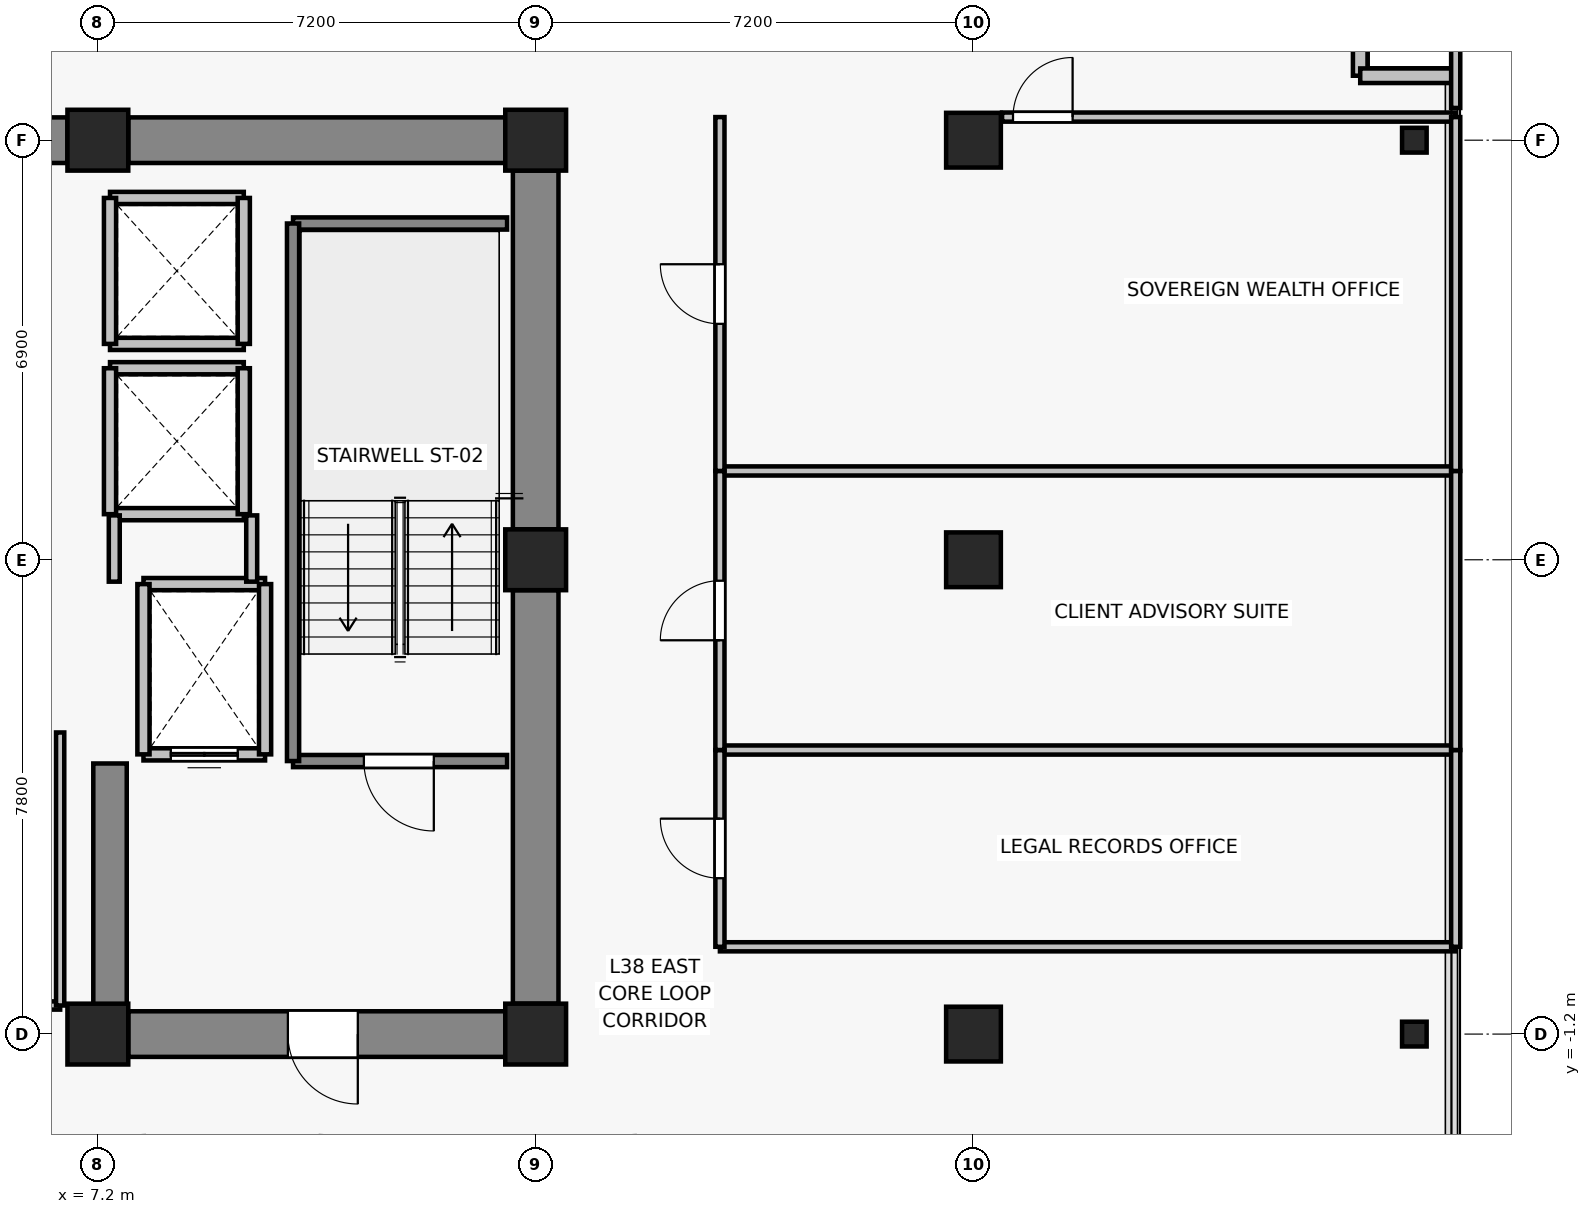
"""IFC4 building model, lengths in metres.
Left out: names, types, materials, properties, quantities, classifications, styles, units other than length and angle.
Written with IfcOpenShell. Run it as: python <this file> out.ifc"""

import sys

from ifc_helpers import new_model, si_unit, direction, frame, frame_2d, origin, origin_2d, place, context, subcontext, project, spatial, rectangle, i_section, extrude, source, transform, mapped, element, fill, save


model = new_model("IFC4")
c1 = context("Model", 3, precision=1e-05, world=origin(), true_north=direction((0.0, 1.0)))
c2 = subcontext(c1, "Body", "Model", "MODEL_VIEW")
j1 = project(units=[si_unit("LENGTHUNIT", "METRE"), si_unit("PLANEANGLEUNIT", "RADIAN")], contexts=[c1])
p1 = place(None, origin())
s1 = spatial("IfcSite", under=j1, at=p1, CompositionType="ELEMENT")
p2 = place(p1, origin())
s2 = spatial("IfcBuilding", under=s1, at=p2, CompositionType="ELEMENT")
p3 = place(p2, frame((0.0, 0.0, 136.3)))
s3 = spatial("IfcBuildingStorey", under=s2, at=p3, CompositionType="ELEMENT", Elevation=136.3)
for number, where, z_axis, x_axis in (
    (1, (7.2, -1.2, 0.0), (0.0, 0.0, 1.0), (1.0, 0.0, 0.0)),
    (2, (14.4, -1.2, 0.0), (0.0, 0.0, 1.0), (1.0, 0.0, 0.0)),
    (3, (14.4, 6.6, 0.0), (0.0, 0.0, 1.0), (1.0, 0.0, 0.0)),
    (4, (7.2, 13.5, 0.0), (0.0, 0.0, 1.0), (1.0, 0.0, 0.0)),
    (5, (14.4, 13.5, 0.0), (0.0, 0.0, 1.0), (1.0, 0.0, 0.0)),
):
    element("IfcColumn", number, at=place(p3, frame(where, z_axis=z_axis, x_axis=x_axis)), inside=s3, PredefinedType="COLUMN", context=c2, shape_type="SweptSolid", body=[
        extrude(rectangle(XDim=1.0, YDim=1.0, at=origin_2d()), origin(), (0.0, 0.0, 1.0), 3.3),
    ])
for number, where, z_axis, x_axis in (
    (6, (21.6, -1.2, 0.0), (0.0, 0.0, 1.0), (1.0, 0.0, 0.0)),
    (7, (21.6, 6.6, 0.0), (0.0, 0.0, 1.0), (1.0, 0.0, 0.0)),
    (8, (21.6, 13.5, 0.0), (0.0, 0.0, 1.0), (1.0, 0.0, 0.0)),
):
    element("IfcColumn", number, at=place(p3, frame(where, z_axis=z_axis, x_axis=x_axis)), inside=s3, PredefinedType="COLUMN", context=c2, shape_type="SweptSolid", body=[
        extrude(rectangle(XDim=0.9, YDim=0.9, at=origin_2d()), origin(), (0.0, 0.0, 1.0), 3.3),
    ])
for number, where, z_axis, x_axis in (
    (9, (28.85, -1.2, 0.0), (0.0, 0.0, 1.0), (1.0, 0.0, 0.0)),
    (10, (28.85, 13.5, 0.0), (0.0, 0.0, 1.0), (1.0, 0.0, 0.0)),
):
    element("IfcColumn", number, at=place(p3, frame(where, z_axis=z_axis, x_axis=x_axis)), inside=s3, PredefinedType="COLUMN", context=c2, shape_type="SweptSolid", body=[
        extrude(i_section(OverallWidth=0.404, OverallDepth=0.407, WebThickness=0.022, FlangeThickness=0.032, FilletRadius=0.015, at=origin_2d()), origin(), (0.0, 0.0, 1.0), 3.3),
    ])
p4 = place(p3, frame((-6.7, 13.5, 0.0), z_axis=(0.0, 0.0, 1.0), x_axis=(1.0, 0.0, 0.0)))
e11 = element("IfcWall", 11, at=p4, inside=s3, PredefinedType="SHEAR", context=c2, shape_type="SweptSolid", body=[
    extrude(rectangle(XDim=13.4, YDim=0.75, at=frame_2d((6.7, 0.0))), origin(), (0.0, 0.0, 1.0), 3.05),
])
p5 = place(p3, frame((7.7, 13.5, 0.0), z_axis=(0.0, 0.0, 1.0), x_axis=(1.0, 0.0, 0.0)))
e12 = element("IfcWall", 12, at=p5, inside=s3, PredefinedType="SHEAR", context=c2, shape_type="SweptSolid", body=[
    extrude(rectangle(XDim=6.2, YDim=0.75, at=frame_2d((3.1, 0.0))), origin(), (0.0, 0.0, 1.0), 3.05),
])
p6 = place(p3, frame((14.4, -0.7, 0.0), z_axis=(0.0, 0.0, 1.0), x_axis=(0.0, 1.0, 0.0)))
e13 = element("IfcWall", 13, at=p6, inside=s3, PredefinedType="SHEAR", context=c2, shape_type="SweptSolid", body=[
    extrude(rectangle(XDim=6.8, YDim=0.75, at=frame_2d((3.4, 0.0))), origin(), (0.0, 0.0, 1.0), 3.05),
])
p7 = place(p3, frame((14.4, 7.1, 0.0), z_axis=(0.0, 0.0, 1.0), x_axis=(0.0, 1.0, 0.0)))
e14 = element("IfcWall", 14, at=p7, inside=s3, PredefinedType="SHEAR", context=c2, shape_type="SweptSolid", body=[
    extrude(rectangle(XDim=5.9, YDim=0.75, at=frame_2d((2.95, 0.0))), origin(), (0.0, 0.0, 1.0), 3.05),
])
p8 = place(p3, frame((13.9, -1.2, 0.0), z_axis=(0.0, 0.0, 1.0), x_axis=(-1.0, 0.0, 0.0)))
e15 = element("IfcWall", 15, at=p8, inside=s3, PredefinedType="SHEAR", context=c2, shape_type="SweptSolid", body=[
    extrude(rectangle(XDim=6.2, YDim=0.75, at=frame_2d((3.1, 0.0))), origin(), (0.0, 0.0, 1.0), 3.05),
])
p9 = place(p8, frame((2.425, 0.0, 0.0)))
e16 = element("IfcOpeningElement", 16, at=p9, cuts=e15, PredefinedType="OPENING", context=c2, shape_type="SweptSolid", body=[
    extrude(rectangle(XDim=1.15, YDim=2.15, at=frame_2d((0.575, 1.075))), frame((0.0, 0.385, 0.0), z_axis=(0.0, -1.0, 0.0), x_axis=(1.0, 0.0, 0.0)), (0.0, 0.0, 1.0), 0.77),
])
p10 = place(p3, frame((7.4, -0.825, 0.0), z_axis=(0.0, 0.0, 1.0), x_axis=(0.0, 1.0, 0.0)))
e17 = element("IfcWall", 17, at=p10, inside=s3, PredefinedType="SHEAR", context=c2, shape_type="SweptSolid", body=[
    extrude(rectangle(XDim=4.075, YDim=0.55, at=frame_2d((2.038, 0.0))), origin(), (0.0, 0.0, 1.0), 3.05),
])
for number, where, z_axis, x_axis in (
    (18, (27.96, 14.56, 0.0), (0.0, 0.0, 1.0), (0.0, 1.0, 0.0)),
    (19, (29.46, 14.56, 0.0), (0.0, 0.0, 1.0), (-1.0, 0.0, 0.0)),
):
    element("IfcWall", number, at=place(p3, frame(where, z_axis=z_axis, x_axis=x_axis)), inside=s3, PredefinedType="SOLIDWALL", context=c2, shape_type="SweptSolid", body=[
        extrude(rectangle(XDim=1.5, YDim=0.24, at=frame_2d((0.75, 0.0))), origin(), (0.0, 0.0, 1.0), 3.05),
    ])
p11 = place(p3, frame((9.95, 3.4, 0.0), z_axis=(0.0, 0.0, 1.0), x_axis=(-1.0, 0.0, 0.0)))
e20 = element("IfcWall", 20, at=p11, inside=s3, PredefinedType="SOLIDWALL", context=c2, shape_type="SweptSolid", body=[
    extrude(rectangle(XDim=2.0, YDim=0.2, at=frame_2d((1.0, 0.0))), origin(), (0.0, 0.0, 1.0), 3.05),
])
p12 = place(p11, frame((0.45, 0.0, 0.0)))
e21 = element("IfcOpeningElement", 21, at=p12, cuts=e20, PredefinedType="OPENING", context=c2, shape_type="SweptSolid", body=[
    extrude(rectangle(XDim=1.1, YDim=2.2, at=frame_2d((0.55, 1.1))), frame((0.0, 0.11, 0.0), z_axis=(0.0, -1.0, 0.0), x_axis=(1.0, 0.0, 0.0)), (0.0, 0.0, 1.0), 0.22),
])
p13 = place(p3, frame((7.95, 6.2, 0.0), z_axis=(0.0, 0.0, 1.0), x_axis=(1.0, 0.0, 0.0)))
e22 = element("IfcWall", 22, at=p13, inside=s3, PredefinedType="SOLIDWALL", context=c2, shape_type="SweptSolid", body=[
    extrude(rectangle(XDim=2.0, YDim=0.2, at=frame_2d((1.0, 0.0))), origin(), (0.0, 0.0, 1.0), 3.05),
])
for number, where, z_axis, x_axis in (
    (23, (7.95, 3.4, 0.0), (0.0, 0.0, 1.0), (0.0, 1.0, 0.0)),
    (24, (9.95, 6.2, 0.0), (0.0, 0.0, 1.0), (0.0, -1.0, 0.0)),
):
    element("IfcWall", number, at=place(p3, frame(where, z_axis=z_axis, x_axis=x_axis)), inside=s3, PredefinedType="SOLIDWALL", context=c2, shape_type="SweptSolid", body=[
        extrude(rectangle(XDim=2.8, YDim=0.2, at=frame_2d((1.4, 0.0))), origin(), (0.0, 0.0, 1.0), 3.05),
    ])
for number, where, z_axis, x_axis in (
    (25, (9.6, 7.35, 0.0), (0.0, 0.0, 1.0), (-1.0, 0.0, 0.0)),
    (26, (7.4, 9.75, 0.0), (0.0, 0.0, 1.0), (1.0, 0.0, 0.0)),
):
    element("IfcWall", number, at=place(p3, frame(where, z_axis=z_axis, x_axis=x_axis)), inside=s3, PredefinedType="SOLIDWALL", context=c2, shape_type="SweptSolid", body=[
        extrude(rectangle(XDim=2.2, YDim=0.2, at=frame_2d((1.1, 0.0))), origin(), (0.0, 0.0, 1.0), 2.49),
    ])
p14 = place(p3, frame((7.4, 7.35, 0.0), z_axis=(0.0, 0.0, 1.0), x_axis=(0.0, 1.0, 0.0)))
e27 = element("IfcWall", 27, at=p14, inside=s3, PredefinedType="SOLIDWALL", context=c2, shape_type="SweptSolid", body=[
    extrude(rectangle(XDim=2.4, YDim=0.2, at=frame_2d((1.2, 0.0))), origin(), (0.0, 0.0, 1.0), 2.49),
])
p15 = place(p3, frame((9.6, 9.75, 0.0), z_axis=(0.0, 0.0, 1.0), x_axis=(0.0, -1.0, 0.0)))
e28 = element("IfcWall", 28, at=p15, inside=s3, PredefinedType="SOLIDWALL", context=c2, shape_type="SweptSolid", body=[
    extrude(rectangle(XDim=2.4, YDim=0.2, at=frame_2d((1.2, 0.0))), origin(), (0.0, 0.0, 1.0), 3.05),
])
for number, where, z_axis, x_axis in (
    (29, (9.6, 10.15, 0.0), (0.0, 0.0, 1.0), (-1.0, 0.0, 0.0)),
    (30, (7.4, 12.55, 0.0), (0.0, 0.0, 1.0), (1.0, 0.0, 0.0)),
):
    element("IfcWall", number, at=place(p3, frame(where, z_axis=z_axis, x_axis=x_axis)), inside=s3, PredefinedType="SOLIDWALL", context=c2, shape_type="SweptSolid", body=[
        extrude(rectangle(XDim=2.2, YDim=0.2, at=frame_2d((1.1, 0.0))), origin(), (0.0, 0.0, 1.0), 2.49),
    ])
p16 = place(p3, frame((7.4, 10.15, 0.0), z_axis=(0.0, 0.0, 1.0), x_axis=(0.0, 1.0, 0.0)))
e31 = element("IfcWall", 31, at=p16, inside=s3, PredefinedType="SOLIDWALL", context=c2, shape_type="SweptSolid", body=[
    extrude(rectangle(XDim=2.4, YDim=0.2, at=frame_2d((1.2, 0.0))), origin(), (0.0, 0.0, 1.0), 2.49),
])
p17 = place(p3, frame((9.6, 12.55, 0.0), z_axis=(0.0, 0.0, 1.0), x_axis=(0.0, -1.0, 0.0)))
e32 = element("IfcWall", 32, at=p17, inside=s3, PredefinedType="SOLIDWALL", context=c2, shape_type="SweptSolid", body=[
    extrude(rectangle(XDim=2.4, YDim=0.2, at=frame_2d((1.2, 0.0))), origin(), (0.0, 0.0, 1.0), 3.05),
])
p18 = place(p3, frame((13.93, 3.29, 0.0), z_axis=(0.0, 0.0, 1.0), x_axis=(-1.0, 0.0, 0.0)))
e33 = element("IfcWall", 33, at=p18, inside=s3, PredefinedType="SOLIDWALL", context=c2, shape_type="SweptSolid", body=[
    extrude(rectangle(XDim=3.52, YDim=0.2, at=frame_2d((1.76, 0.0))), origin(), (0.0, 0.0, 1.0), 3.05),
])
p19 = place(p18, frame((1.205, 0.0, 0.0)))
e34 = element("IfcOpeningElement", 34, at=p19, cuts=e33, PredefinedType="OPENING", context=c2, shape_type="SweptSolid", body=[
    extrude(rectangle(XDim=1.15, YDim=2.15, at=frame_2d((0.575, 1.075))), frame((0.0, 0.11, 0.0), z_axis=(0.0, -1.0, 0.0), x_axis=(1.0, 0.0, 0.0)), (0.0, 0.0, 1.0), 0.22),
])
p20 = place(p3, frame((10.41, 12.13, 0.0), z_axis=(0.0, 0.0, 1.0), x_axis=(1.0, 0.0, 0.0)))
e35 = element("IfcWall", 35, at=p20, inside=s3, PredefinedType="SOLIDWALL", context=c2, shape_type="SweptSolid", body=[
    extrude(rectangle(XDim=3.52, YDim=0.2, at=frame_2d((1.76, 0.0))), origin(), (0.0, 0.0, 1.0), 3.05),
])
p21 = place(p3, frame((10.41, 3.29, 0.0), z_axis=(0.0, 0.0, 1.0), x_axis=(0.0, 1.0, 0.0)))
e36 = element("IfcWall", 36, at=p21, inside=s3, PredefinedType="SOLIDWALL", context=c2, shape_type="SweptSolid", body=[
    extrude(rectangle(XDim=8.84, YDim=0.2, at=frame_2d((4.42, 0.0))), origin(), (0.0, 0.0, 1.0), 3.05),
])
p22 = place(p3, frame((7.47, 6.24, 0.0), z_axis=(0.0, 0.0, 1.0), x_axis=(0.0, 1.0, 0.0)))
e37 = element("IfcWall", 37, at=p22, inside=s3, PredefinedType="PARTITIONING", context=c2, shape_type="SweptSolid", body=[
    extrude(rectangle(XDim=1.09, YDim=0.18, at=frame_2d((0.545, 0.0))), origin(), (0.0, 0.0, 1.0), 2.49),
])
p23 = place(p3, frame((9.73, 7.33, 0.0), z_axis=(0.0, 0.0, 1.0), x_axis=(0.0, -1.0, 0.0)))
e38 = element("IfcWall", 38, at=p23, inside=s3, PredefinedType="PARTITIONING", context=c2, shape_type="SweptSolid", body=[
    extrude(rectangle(XDim=1.09, YDim=0.18, at=frame_2d((0.545, 0.0))), origin(), (0.0, 0.0, 1.0), 3.05),
])
p24 = place(p3, frame((6.58, -0.73, 0.0), z_axis=(0.0, 0.0, 1.0), x_axis=(-1.0, 0.0, 0.0)))
e39 = element("IfcWall", 39, at=p24, inside=s3, PredefinedType="PARTITIONING", context=c2, shape_type="SweptSolid", body=[
    extrude(rectangle(XDim=2.9, YDim=0.135, at=frame_2d((1.45, 0.0))), origin(), (0.0, 0.0, 1.0), 3.05),
])
p25 = place(p24, frame((0.99, 0.0, 0.0)))
e40 = element("IfcOpeningElement", 40, at=p25, cuts=e39, PredefinedType="OPENING", context=c2, shape_type="SweptSolid", body=[
    extrude(rectangle(XDim=0.92, YDim=2.1, at=frame_2d((0.46, 1.05))), frame((0.0, 0.077, 0.0), z_axis=(0.0, -1.0, 0.0), x_axis=(1.0, 0.0, 0.0)), (0.0, 0.0, 1.0), 0.155),
])
p26 = place(p3, frame((6.58, 3.76, 0.0), z_axis=(0.0, 0.0, 1.0), x_axis=(0.0, -1.0, 0.0)))
e41 = element("IfcWall", 41, at=p26, inside=s3, PredefinedType="PARTITIONING", context=c2, shape_type="SweptSolid", body=[
    extrude(rectangle(XDim=4.49, YDim=0.135, at=frame_2d((2.245, 0.0))), origin(), (0.0, 0.0, 1.0), 3.05),
])
for number, where, z_axis, x_axis in (
    (42, (29.53, 0.236, 0.0), (0.0, 0.0, 1.0), (-1.0, 0.0, 0.0)),
    (43, (17.43, 3.471, 0.0), (0.0, 0.0, 1.0), (1.0, 0.0, 0.0)),
):
    element("IfcWall", number, at=place(p3, frame(where, z_axis=z_axis, x_axis=x_axis)), inside=s3, PredefinedType="PARTITIONING", context=c2, shape_type="SweptSolid", body=[
        extrude(rectangle(XDim=12.1, YDim=0.15, at=frame_2d((6.05, 0.0))), origin(), (0.0, 0.0, 1.0), 2.49),
    ])
p27 = place(p3, frame((17.43, 0.236, 0.0), z_axis=(0.0, 0.0, 1.0), x_axis=(0.0, 1.0, 0.0)))
e44 = element("IfcWall", 44, at=p27, inside=s3, PredefinedType="PARTITIONING", context=c2, shape_type="SweptSolid", body=[
    extrude(rectangle(XDim=3.236, YDim=0.15, at=frame_2d((1.618, 0.0))), origin(), (0.0, 0.0, 1.0), 3.05),
])
p28 = place(p27, frame((1.127, 0.0, 0.0)))
e45 = element("IfcOpeningElement", 45, at=p28, cuts=e44, PredefinedType="OPENING", context=c2, shape_type="SweptSolid", body=[
    extrude(rectangle(XDim=0.98, YDim=2.15, at=frame_2d((0.49, 1.075))), frame((0.0, 0.085, 0.0), z_axis=(0.0, -1.0, 0.0), x_axis=(1.0, 0.0, 0.0)), (0.0, 0.0, 1.0), 0.17),
])
p29 = place(p3, frame((29.53, 3.471, 0.0), z_axis=(0.0, 0.0, 1.0), x_axis=(0.0, -1.0, 0.0)))
e46 = element("IfcWall", 46, at=p29, inside=s3, PredefinedType="PARTITIONING", context=c2, shape_type="SweptSolid", body=[
    extrude(rectangle(XDim=3.236, YDim=0.15, at=frame_2d((1.618, 0.0))), origin(), (0.0, 0.0, 1.0), 3.05),
])
p30 = place(p3, frame((17.43, 8.061, 0.0), z_axis=(0.0, 0.0, 1.0), x_axis=(1.0, 0.0, 0.0)))
e47 = element("IfcWall", 47, at=p30, inside=s3, PredefinedType="PARTITIONING", context=c2, shape_type="SweptSolid", body=[
    extrude(rectangle(XDim=12.1, YDim=0.15, at=frame_2d((6.05, 0.0))), origin(), (0.0, 0.0, 1.0), 2.49),
])
p31 = place(p3, frame((17.43, 3.471, 0.0), z_axis=(0.0, 0.0, 1.0), x_axis=(0.0, 1.0, 0.0)))
e48 = element("IfcWall", 48, at=p31, inside=s3, PredefinedType="PARTITIONING", context=c2, shape_type="SweptSolid", body=[
    extrude(rectangle(XDim=4.589, YDim=0.15, at=frame_2d((2.295, 0.0))), origin(), (0.0, 0.0, 1.0), 2.49),
])
p32 = place(p31, frame((1.805, 0.0, 0.0)))
e49 = element("IfcOpeningElement", 49, at=p32, cuts=e48, PredefinedType="OPENING", context=c2, shape_type="SweptSolid", body=[
    extrude(rectangle(XDim=0.98, YDim=2.15, at=frame_2d((0.49, 1.075))), frame((0.0, 0.085, 0.0), z_axis=(0.0, -1.0, 0.0), x_axis=(1.0, 0.0, 0.0)), (0.0, 0.0, 1.0), 0.17),
])
p33 = place(p3, frame((29.53, 8.061, 0.0), z_axis=(0.0, 0.0, 1.0), x_axis=(0.0, -1.0, 0.0)))
e50 = element("IfcWall", 50, at=p33, inside=s3, PredefinedType="PARTITIONING", context=c2, shape_type="SweptSolid", body=[
    extrude(rectangle(XDim=4.589, YDim=0.15, at=frame_2d((2.295, 0.0))), origin(), (0.0, 0.0, 1.0), 3.05),
])
p34 = place(p3, frame((22.07, 13.88, 0.0), z_axis=(0.0, 0.0, 1.0), x_axis=(1.0, 0.0, 0.0)))
e51 = element("IfcWall", 51, at=p34, inside=s3, PredefinedType="PARTITIONING", context=c2, shape_type="SweptSolid", body=[
    extrude(rectangle(XDim=7.46, YDim=0.15, at=frame_2d((3.73, 0.0))), origin(), (0.0, 0.0, 1.0), 3.05),
])
p35 = place(p34, frame((0.18, 0.0, 0.0)))
e52 = element("IfcOpeningElement", 52, at=p35, cuts=e51, PredefinedType="OPENING", context=c2, shape_type="SweptSolid", body=[
    extrude(rectangle(XDim=0.98, YDim=2.15, at=frame_2d((0.49, 1.075))), frame((0.0, 0.085, 0.0), z_axis=(0.0, -1.0, 0.0), x_axis=(1.0, 0.0, 0.0)), (0.0, 0.0, 1.0), 0.17),
])
p36 = place(p3, frame((17.43, 8.061, 0.0), z_axis=(0.0, 0.0, 1.0), x_axis=(0.0, 1.0, 0.0)))
e53 = element("IfcWall", 53, at=p36, inside=s3, PredefinedType="PARTITIONING", context=c2, shape_type="SweptSolid", body=[
    extrude(rectangle(XDim=5.819, YDim=0.15, at=frame_2d((2.91, 0.0))), origin(), (0.0, 0.0, 1.0), 2.49),
])
p37 = place(p36, frame((2.419, 0.0, 0.0)))
e54 = element("IfcOpeningElement", 54, at=p37, cuts=e53, PredefinedType="OPENING", context=c2, shape_type="SweptSolid", body=[
    extrude(rectangle(XDim=0.98, YDim=2.15, at=frame_2d((0.49, 1.075))), frame((0.0, 0.085, 0.0), z_axis=(0.0, -1.0, 0.0), x_axis=(1.0, 0.0, 0.0)), (0.0, 0.0, 1.0), 0.17),
])
p38 = place(p3, frame((29.53, 13.88, 0.0), z_axis=(0.0, 0.0, 1.0), x_axis=(0.0, -1.0, 0.0)))
e55 = element("IfcWall", 55, at=p38, inside=s3, PredefinedType="PARTITIONING", context=c2, shape_type="SweptSolid", body=[
    extrude(rectangle(XDim=5.819, YDim=0.15, at=frame_2d((2.91, 0.0))), origin(), (0.0, 0.0, 1.0), 3.05),
])
p39 = place(p3, frame((29.53, 17.63, 0.0), z_axis=(0.0, 0.0, 1.0), x_axis=(0.0, -1.0, 0.0)))
e56 = element("IfcWall", 56, at=p39, inside=s3, PredefinedType="PARTITIONING", context=c2, shape_type="SweptSolid", body=[
    extrude(rectangle(XDim=3.6, YDim=0.15, at=frame_2d((1.8, 0.0))), origin(), (0.0, 0.0, 1.0), 3.05),
])
m1 = source(origin(), c2, "Body", "SweptSolid", [
    extrude(rectangle(XDim=1.1, YDim=2.2, at=frame_2d((0.55, 1.1))), frame((0.0, 0.025, 0.0), z_axis=(0.0, -1.0, 0.0), x_axis=(1.0, 0.0, 0.0)), (0.0, 0.0, 1.0), 0.05),
])
p40 = place(p12, origin())
e57 = element("IfcDoor", 57, at=p40, inside=s3, OperationType="DOUBLE_DOOR_SLIDING", PredefinedType="DOOR", context=c2, shape_type="MappedRepresentation", body=[
    mapped(m1, transform((0.0, 0.0, 0.0), x_axis=(1.0, 0.0, 0.0), y_axis=(0.0, 1.0, 0.0), z_axis=(0.0, 0.0, 1.0), scale=1.0)),
])
fill(e21, e57)
m2 = source(origin(), c2, "Body", "SweptSolid", [
    extrude(rectangle(XDim=1.15, YDim=2.15, at=frame_2d((0.575, 1.075))), frame((0.0, 0.025, 0.0), z_axis=(0.0, -1.0, 0.0), x_axis=(1.0, 0.0, 0.0)), (0.0, 0.0, 1.0), 0.05),
])
p41 = place(p19, origin())
e58 = element("IfcDoor", 58, at=p41, inside=s3, OperationType="SINGLE_SWING_LEFT", PredefinedType="DOOR", context=c2, shape_type="MappedRepresentation", body=[
    mapped(m2, transform((0.0, 0.0, 0.0), x_axis=(1.0, 0.0, 0.0), y_axis=(0.0, 1.0, 0.0), z_axis=(0.0, 0.0, 1.0), scale=1.0)),
])
fill(e34, e58)
p42 = place(p9, origin())
e59 = element("IfcDoor", 59, at=p42, inside=s3, OperationType="SINGLE_SWING_LEFT", PredefinedType="DOOR", context=c2, shape_type="MappedRepresentation", body=[
    mapped(m2, transform((0.0, 0.0, 0.0), x_axis=(1.0, 0.0, 0.0), y_axis=(0.0, 1.0, 0.0), z_axis=(0.0, 0.0, 1.0), scale=1.0)),
])
fill(e16, e59)
m3 = source(origin(), c2, "Body", "SweptSolid", [
    extrude(rectangle(XDim=0.98, YDim=2.15, at=frame_2d((0.49, 1.075))), frame((0.0, 0.025, 0.0), z_axis=(0.0, -1.0, 0.0), x_axis=(1.0, 0.0, 0.0)), (0.0, 0.0, 1.0), 0.05),
])
p43 = place(p28, origin())
e60 = element("IfcDoor", 60, at=p43, inside=s3, OperationType="SINGLE_SWING_RIGHT", PredefinedType="DOOR", context=c2, shape_type="MappedRepresentation", body=[
    mapped(m3, transform((0.0, 0.0, 0.0), x_axis=(1.0, 0.0, 0.0), y_axis=(0.0, 1.0, 0.0), z_axis=(0.0, 0.0, 1.0), scale=1.0)),
])
fill(e45, e60)
p44 = place(p32, origin())
e61 = element("IfcDoor", 61, at=p44, inside=s3, OperationType="SINGLE_SWING_LEFT", PredefinedType="DOOR", context=c2, shape_type="MappedRepresentation", body=[
    mapped(m3, transform((0.0, 0.0, 0.0), x_axis=(1.0, 0.0, 0.0), y_axis=(0.0, 1.0, 0.0), z_axis=(0.0, 0.0, 1.0), scale=1.0)),
])
fill(e49, e61)
p45 = place(p37, origin())
e62 = element("IfcDoor", 62, at=p45, inside=s3, OperationType="SINGLE_SWING_RIGHT", PredefinedType="DOOR", context=c2, shape_type="MappedRepresentation", body=[
    mapped(m3, transform((0.0, 0.0, 0.0), x_axis=(1.0, 0.0, 0.0), y_axis=(0.0, 1.0, 0.0), z_axis=(0.0, 0.0, 1.0), scale=1.0)),
])
fill(e54, e62)
p46 = place(p35, origin())
e63 = element("IfcDoor", 63, at=p46, inside=s3, OperationType="SINGLE_SWING_RIGHT", PredefinedType="DOOR", context=c2, shape_type="MappedRepresentation", body=[
    mapped(m3, transform((0.0, 0.0, 0.0), x_axis=(1.0, 0.0, 0.0), y_axis=(0.0, 1.0, 0.0), z_axis=(0.0, 0.0, 1.0), scale=1.0)),
])
fill(e52, e63)
save(model, sys.argv[1])
